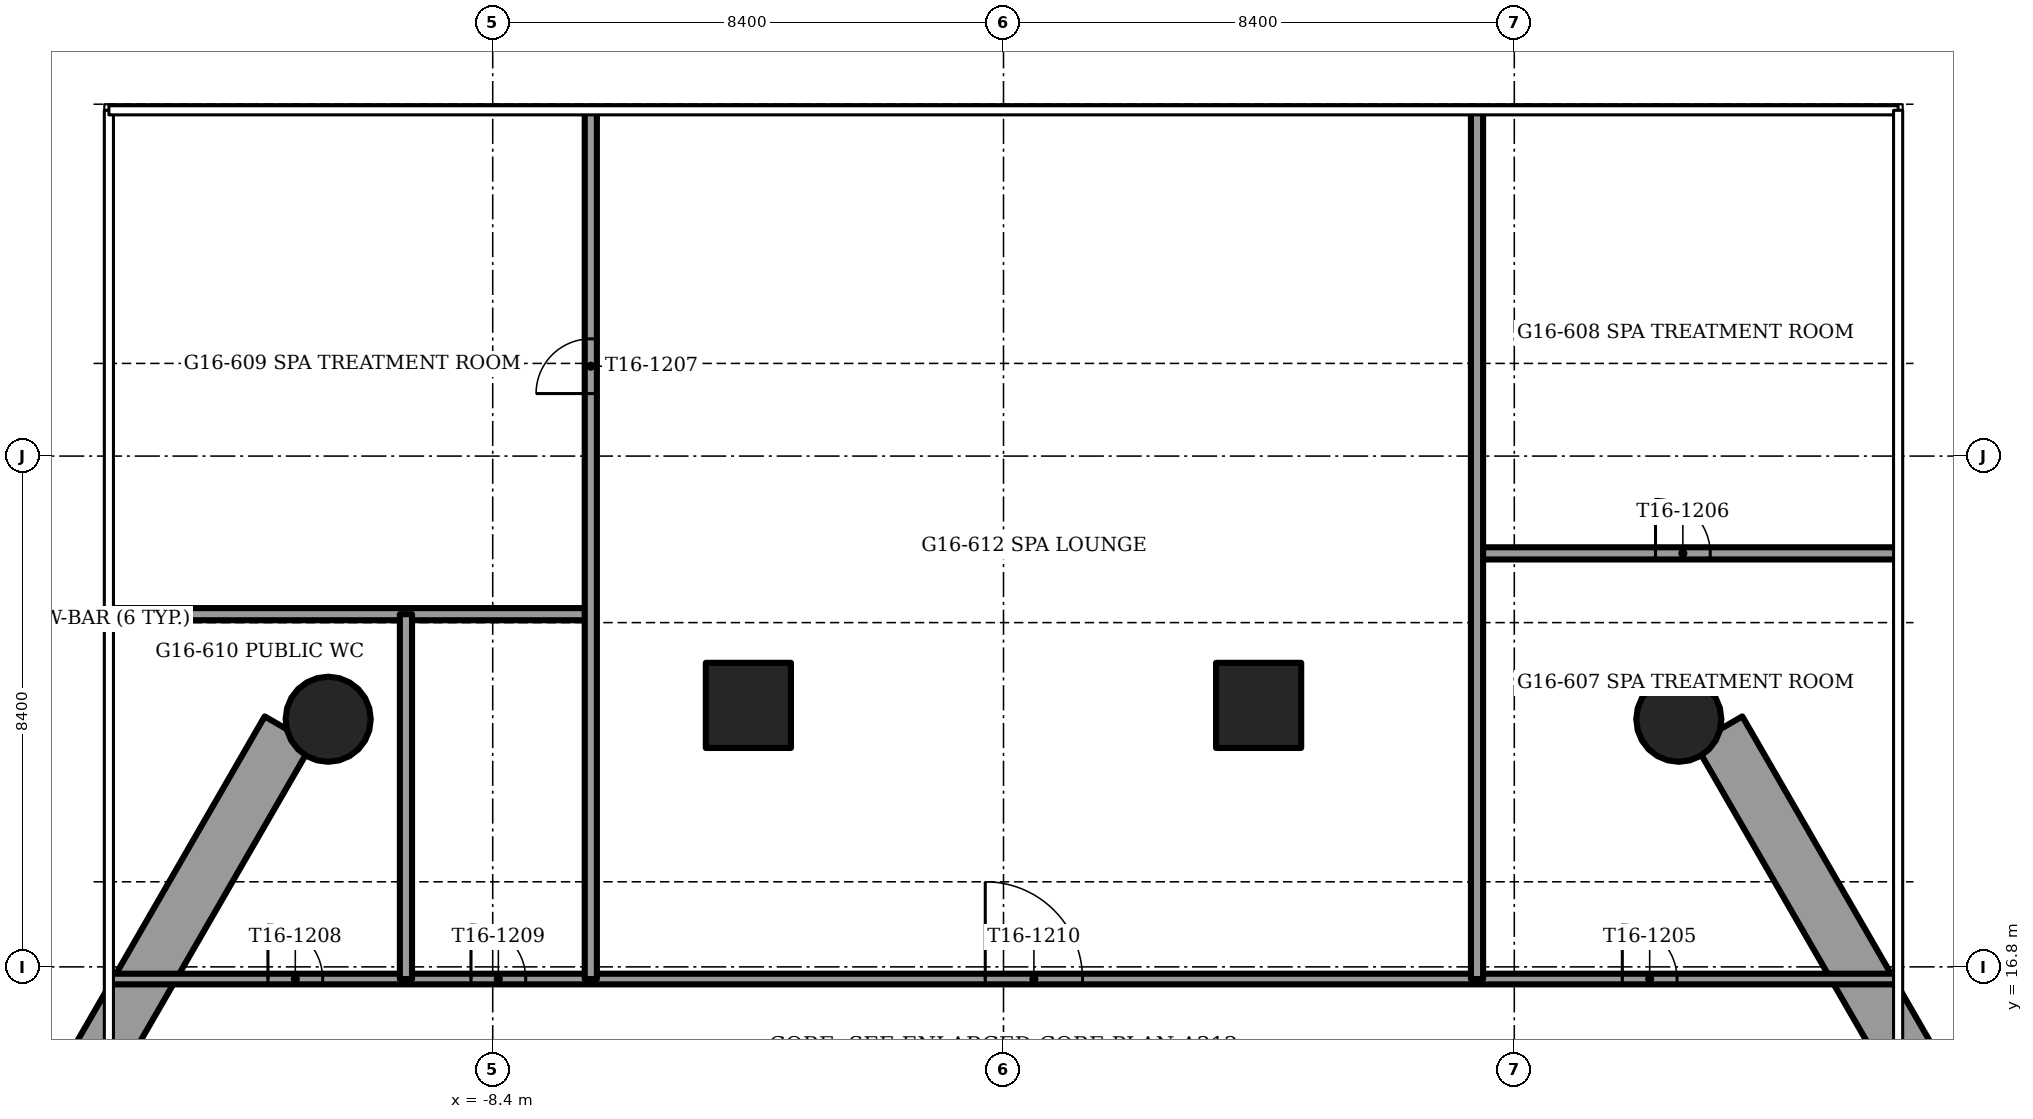
"""IFC4 building model, lengths in metres.
Left out: names, types, materials, properties, quantities, classifications, styles, units other than length and angle.
Written with IfcOpenShell. Run it as: python <this file> out.ifc"""

import sys

from ifc_helpers import new_model, si_unit, direction, frame, frame_2d, origin, origin_2d, place, context, subcontext, project, spatial, rectangle, circle, extrude, element, fill, save


model = new_model("IFC4")
c1 = context("Model", 3, precision=1e-05, world=origin(), true_north=direction((0.0, 1.0)))
c2 = subcontext(c1, "Body", "Model", "MODEL_VIEW")
j1 = project(units=[si_unit("LENGTHUNIT", "METRE"), si_unit("PLANEANGLEUNIT", "RADIAN")], contexts=[c1])
p1 = place(None, origin())
s1 = spatial("IfcSite", under=j1, at=p1, CompositionType="ELEMENT")
p2 = place(p1, origin())
s2 = spatial("IfcBuilding", under=s1, at=p2, CompositionType="ELEMENT")
p3 = place(p2, frame((0.0, 0.0, 65.5)))
s3 = spatial("IfcBuildingStorey", under=s2, at=p3, CompositionType="ELEMENT", Elevation=65.5)
for number, where, z_axis, x_axis in (
    (1, (-11.106, 20.872, -1.2), (0.0, 0.0, 1.0), (1.0, 0.0, 0.0)),
    (2, (11.106, 20.872, -1.2), (0.0, 0.0, 1.0), (1.0, 0.0, 0.0)),
):
    element("IfcColumn", number, at=place(p3, frame(where, z_axis=z_axis, x_axis=x_axis)), inside=s3, PredefinedType="COLUMN", context=c2, shape_type="SweptSolid", body=[
        extrude(circle(Radius=0.7, at=origin_2d()), origin(), (0.0, 0.0, 1.0), 3.75),
    ])
for number, where, z_axis, x_axis in (
    (3, (4.195, 21.1, -1.2), (0.0, 0.0, 1.0), (1.0, 0.0, 0.0)),
    (4, (-4.195, 21.1, -1.2), (0.0, 0.0, 1.0), (1.0, 0.0, 0.0)),
):
    element("IfcColumn", number, at=place(p3, frame(where, z_axis=z_axis, x_axis=x_axis)), inside=s3, PredefinedType="COLUMN", context=c2, shape_type="SweptSolid", body=[
        extrude(rectangle(XDim=1.4, YDim=1.4, at=origin_2d()), origin(), (0.0, 0.0, 1.0), 3.75),
    ])
for number, where, z_axis, x_axis in (
    (5, (-11.76, 20.694, 0.0), (0.0, 0.0, 1.0), (-0.5, -0.866, 0.0)),
    (6, (15.348, 14.479, 0.0), (0.0, 0.0, 1.0), (-0.5, 0.866, 0.0)),
):
    element("IfcWall", number, at=place(p3, frame(where, z_axis=z_axis, x_axis=x_axis)), inside=s3, PredefinedType="PARAPET", context=c2, shape_type="SweptSolid", body=[
        extrude(rectangle(XDim=7.176, YDim=0.9, at=frame_2d((3.588, 0.0))), origin(), (0.0, 0.0, 1.0), 1.1),
    ])
p4 = place(p3, frame((-14.693, 16.6, 0.0), z_axis=(0.0, 0.0, 1.0), x_axis=(1.0, 0.0, 0.0)))
e7 = element("IfcWall", 7, at=p4, inside=s3, PredefinedType="PARTITIONING", context=c2, shape_type="SweptSolid", body=[
    extrude(rectangle(XDim=29.386, YDim=0.175, at=frame_2d((14.693, 0.0))), origin(), (0.0, 0.0, 1.0), 2.25),
])
p5 = place(p4, frame((24.87, 0.0, 0.0)))
e8 = element("IfcOpeningElement", 8, at=p5, cuts=e7, PredefinedType="OPENING", context=c2, shape_type="SweptSolid", body=[
    extrude(rectangle(XDim=0.9, YDim=2.1, at=frame_2d((0.45, 1.05))), frame((0.0, 0.087, 0.0), z_axis=(0.0, -1.0, 0.0), x_axis=(1.0, 0.0, 0.0)), (0.0, 0.0, 1.0), 0.175),
])
p6 = place(p4, frame((2.597, 0.0, 0.0)))
e9 = element("IfcOpeningElement", 9, at=p6, cuts=e7, PredefinedType="OPENING", context=c2, shape_type="SweptSolid", body=[
    extrude(rectangle(XDim=0.9, YDim=2.1, at=frame_2d((0.45, 1.05))), frame((0.0, 0.087, 0.0), z_axis=(0.0, -1.0, 0.0), x_axis=(1.0, 0.0, 0.0)), (0.0, 0.0, 1.0), 0.175),
])
p7 = place(p4, frame((5.936, 0.0, 0.0)))
e10 = element("IfcOpeningElement", 10, at=p7, cuts=e7, PredefinedType="OPENING", context=c2, shape_type="SweptSolid", body=[
    extrude(rectangle(XDim=0.9, YDim=2.1, at=frame_2d((0.45, 1.05))), frame((0.0, 0.087, 0.0), z_axis=(0.0, -1.0, 0.0), x_axis=(1.0, 0.0, 0.0)), (0.0, 0.0, 1.0), 0.175),
])
p8 = place(p4, frame((14.393, 0.0, 0.0)))
e11 = element("IfcOpeningElement", 11, at=p8, cuts=e7, PredefinedType="OPENING", context=c2, shape_type="SweptSolid", body=[
    extrude(rectangle(XDim=1.6, YDim=2.1, at=frame_2d((0.8, 1.05))), frame((0.0, 0.087, 0.0), z_axis=(0.0, -1.0, 0.0), x_axis=(1.0, 0.0, 0.0)), (0.0, 0.0, 1.0), 0.175),
])
p9 = place(p3, frame((-14.693, 22.6, 0.0), z_axis=(0.0, 0.0, 1.0), x_axis=(1.0, 0.0, 0.0)))
e12 = element("IfcWall", 12, at=p9, inside=s3, PredefinedType="PARTITIONING", context=c2, shape_type="SweptSolid", body=[
    extrude(rectangle(XDim=7.906, YDim=0.2, at=frame_2d((3.953, 0.0))), origin(), (0.0, 0.0, 1.0), 2.828),
])
p10 = place(p3, frame((7.787, 23.6, 0.0), z_axis=(0.0, 0.0, 1.0), x_axis=(1.0, 0.0, 0.0)))
e13 = element("IfcWall", 13, at=p10, inside=s3, PredefinedType="PARTITIONING", context=c2, shape_type="SweptSolid", body=[
    extrude(rectangle(XDim=6.906, YDim=0.2, at=frame_2d((3.453, 0.0))), origin(), (0.0, 0.0, 1.0), 3.45),
])
p11 = place(p10, frame((2.935, 0.0, 0.0)))
e14 = element("IfcOpeningElement", 14, at=p11, cuts=e13, PredefinedType="OPENING", context=c2, shape_type="SweptSolid", body=[
    extrude(rectangle(XDim=0.9, YDim=2.1, at=frame_2d((0.45, 1.05))), frame((0.0, 0.1, 0.0), z_axis=(0.0, -1.0, 0.0), x_axis=(1.0, 0.0, 0.0)), (0.0, 0.0, 1.0), 0.2),
])
p12 = place(p3, frame((-9.827, 16.6, 0.0), z_axis=(0.0, 0.0, 1.0), x_axis=(0.0, 1.0, 0.0)))
e15 = element("IfcWall", 15, at=p12, inside=s3, PredefinedType="PARTITIONING", context=c2, shape_type="SweptSolid", body=[
    extrude(rectangle(XDim=6.0, YDim=0.2, at=frame_2d((3.0, 0.0))), origin(), (0.0, 0.0, 1.0), 2.828),
])
p13 = place(p3, frame((-6.787, 16.6, 0.0), z_axis=(0.0, 0.0, 1.0), x_axis=(0.0, 1.0, 0.0)))
e16 = element("IfcWall", 16, at=p13, inside=s3, PredefinedType="PARTITIONING", context=c2, shape_type="SweptSolid", body=[
    extrude(rectangle(XDim=14.267, YDim=0.2, at=frame_2d((7.134, 0.0))), origin(), (0.0, 0.0, 1.0), 2.828),
])
p14 = place(p13, frame((9.628, 0.0, 0.0)))
e17 = element("IfcOpeningElement", 17, at=p14, cuts=e16, PredefinedType="OPENING", context=c2, shape_type="SweptSolid", body=[
    extrude(rectangle(XDim=0.9, YDim=2.1, at=frame_2d((0.45, 1.05))), frame((0.0, 0.1, 0.0), z_axis=(0.0, -1.0, 0.0), x_axis=(1.0, 0.0, 0.0)), (0.0, 0.0, 1.0), 0.2),
])
p15 = place(p3, frame((7.787, 16.6, 0.0), z_axis=(0.0, 0.0, 1.0), x_axis=(0.0, 1.0, 0.0)))
e18 = element("IfcWall", 18, at=p15, inside=s3, PredefinedType="PARTITIONING", context=c2, shape_type="SweptSolid", body=[
    extrude(rectangle(XDim=14.267, YDim=0.2, at=frame_2d((7.134, 0.0))), origin(), (0.0, 0.0, 1.0), 2.828),
])
p16 = place(p5, origin())
e19 = element("IfcDoor", 19, at=p16, inside=s3, OperationType="SINGLE_SWING_LEFT", PredefinedType="DOOR", context=c2, shape_type="SweptSolid", body=[
    extrude(rectangle(XDim=0.9, YDim=2.1, at=frame_2d((0.45, 1.05))), frame((0.0, 0.025, 0.0), z_axis=(0.0, -1.0, 0.0), x_axis=(1.0, 0.0, 0.0)), (0.0, 0.0, 1.0), 0.05),
])
fill(e8, e19)
p17 = place(p11, origin())
e20 = element("IfcDoor", 20, at=p17, inside=s3, OperationType="SINGLE_SWING_RIGHT", PredefinedType="DOOR", context=c2, shape_type="SweptSolid", body=[
    extrude(rectangle(XDim=0.9, YDim=2.1, at=frame_2d((0.45, 1.05))), frame((0.0, 0.025, 0.0), z_axis=(0.0, -1.0, 0.0), x_axis=(1.0, 0.0, 0.0)), (0.0, 0.0, 1.0), 0.05),
])
fill(e14, e20)
p18 = place(p14, origin())
e21 = element("IfcDoor", 21, at=p18, inside=s3, OperationType="SINGLE_SWING_LEFT", PredefinedType="DOOR", context=c2, shape_type="SweptSolid", body=[
    extrude(rectangle(XDim=0.9, YDim=2.1, at=frame_2d((0.45, 1.05))), frame((0.0, 0.025, 0.0), z_axis=(0.0, -1.0, 0.0), x_axis=(1.0, 0.0, 0.0)), (0.0, 0.0, 1.0), 0.05),
])
fill(e17, e21)
p19 = place(p6, origin())
e22 = element("IfcDoor", 22, at=p19, inside=s3, OperationType="SINGLE_SWING_RIGHT", PredefinedType="DOOR", context=c2, shape_type="SweptSolid", body=[
    extrude(rectangle(XDim=0.9, YDim=2.1, at=frame_2d((0.45, 1.05))), frame((0.0, 0.025, 0.0), z_axis=(0.0, -1.0, 0.0), x_axis=(1.0, 0.0, 0.0)), (0.0, 0.0, 1.0), 0.05),
])
fill(e9, e22)
p20 = place(p7, origin())
e23 = element("IfcDoor", 23, at=p20, inside=s3, OperationType="SINGLE_SWING_LEFT", PredefinedType="DOOR", context=c2, shape_type="SweptSolid", body=[
    extrude(rectangle(XDim=0.9, YDim=2.1, at=frame_2d((0.45, 1.05))), frame((0.0, 0.025, 0.0), z_axis=(0.0, -1.0, 0.0), x_axis=(1.0, 0.0, 0.0)), (0.0, 0.0, 1.0), 0.05),
])
fill(e10, e23)
p21 = place(p8, origin())
e24 = element("IfcDoor", 24, at=p21, inside=s3, OperationType="DOUBLE_DOOR_SINGLE_SWING", PredefinedType="DOOR", context=c2, shape_type="SweptSolid", body=[
    extrude(rectangle(XDim=1.6, YDim=2.1, at=frame_2d((0.8, 1.05))), frame((0.0, 0.025, 0.0), z_axis=(0.0, -1.0, 0.0), x_axis=(1.0, 0.0, 0.0)), (0.0, 0.0, 1.0), 0.05),
])
fill(e11, e24)
save(model, sys.argv[1])
